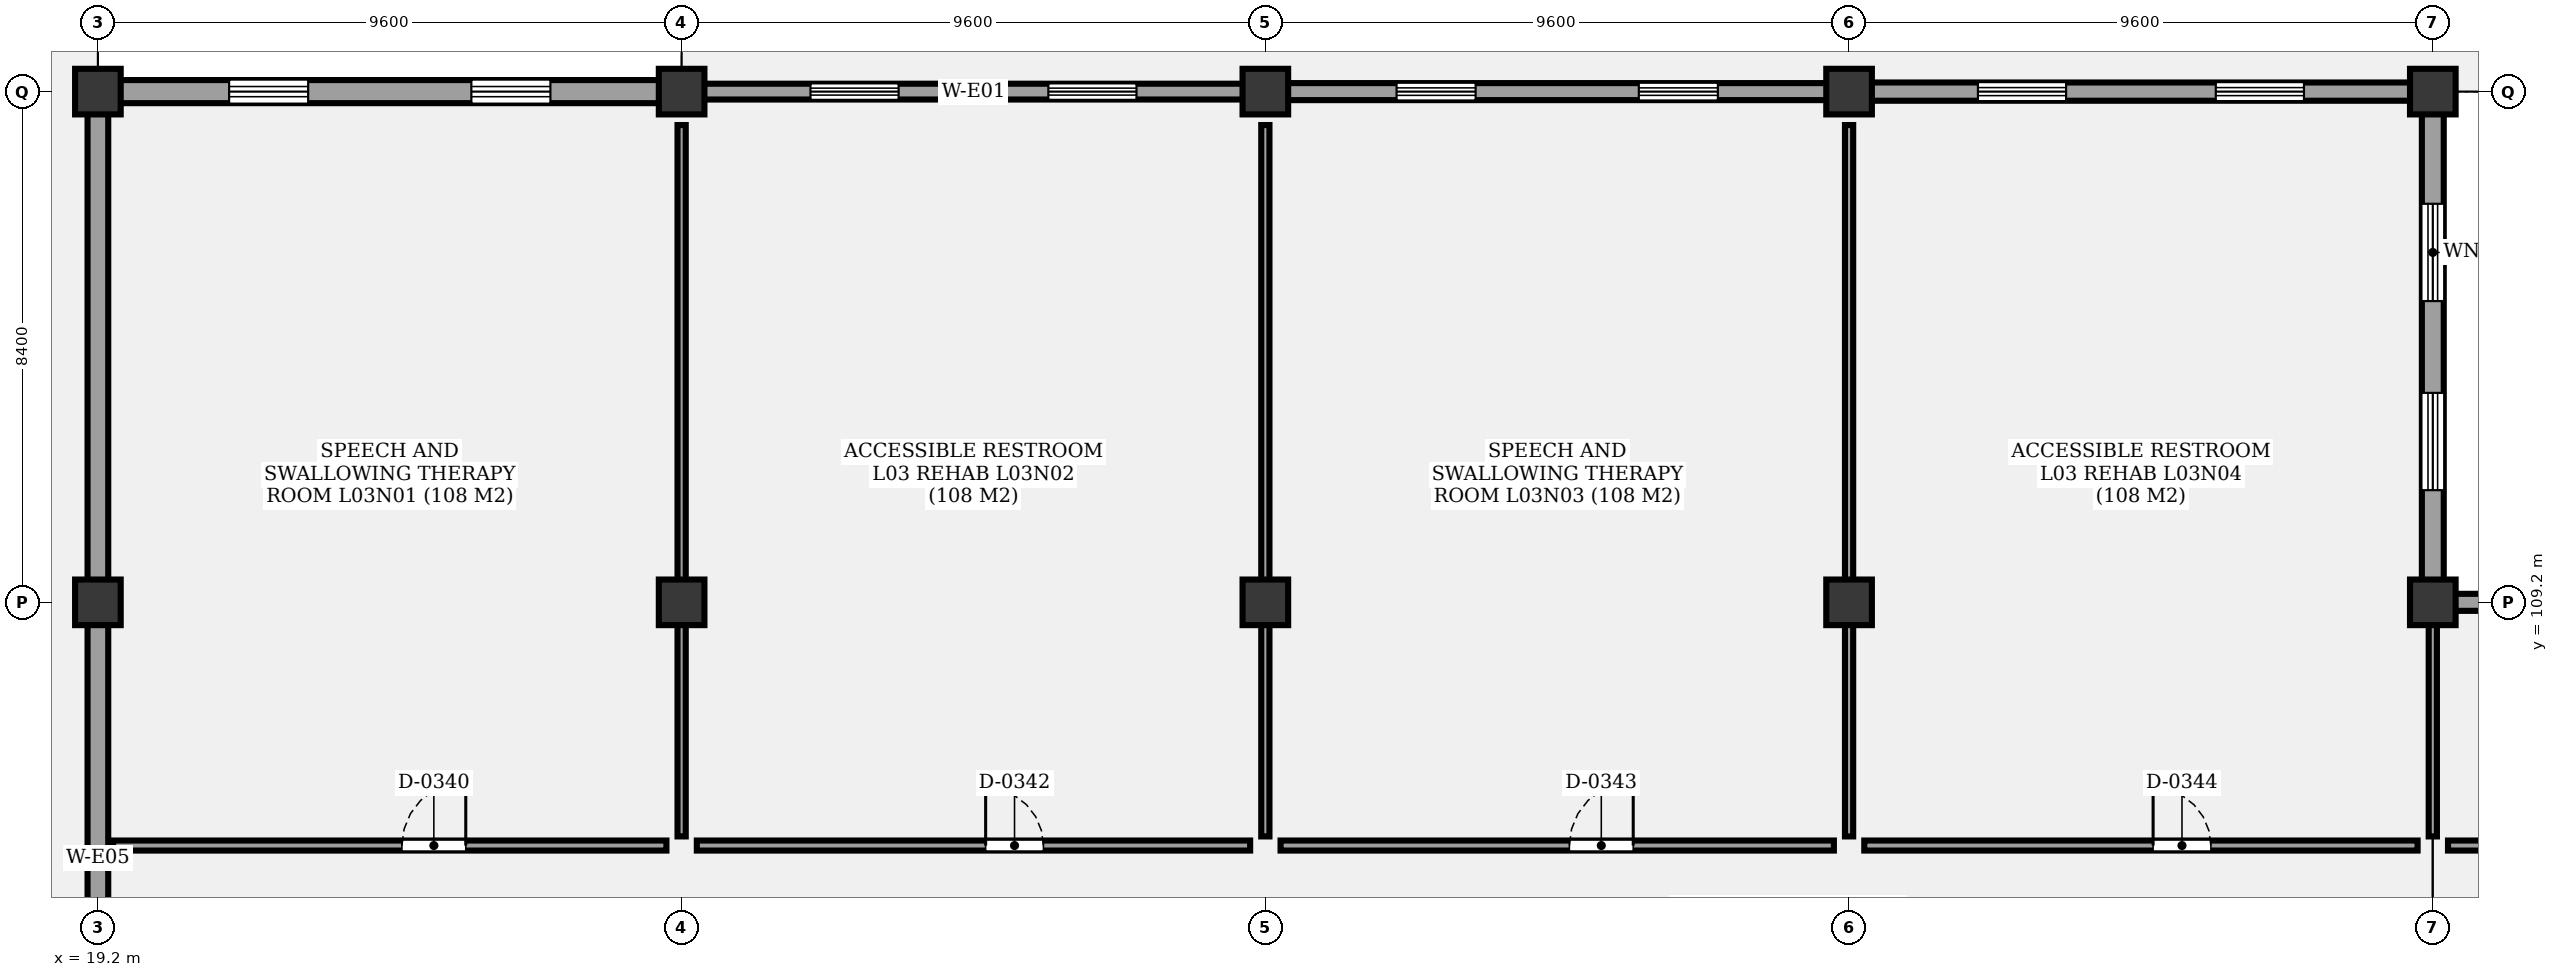
"""IFC4 building model, lengths in metres.
Left out: names, types, materials, properties, quantities, classifications, styles, units other than length and angle.
Written with IfcOpenShell. Run it as: python <this file> out.ifc"""

import sys

from ifc_helpers import new_model, si_unit, direction, frame, frame_2d, origin, origin_2d, place, context, subcontext, project, spatial, rectangle, extrude, element, fill, save


model = new_model("IFC4")
c1 = context("Model", 3, precision=1e-05, world=origin(), true_north=direction((0.0, 1.0)))
c2 = subcontext(c1, "Body", "Model", "MODEL_VIEW")
j1 = project(units=[si_unit("LENGTHUNIT", "METRE"), si_unit("PLANEANGLEUNIT", "RADIAN")], contexts=[c1])
p1 = place(None, origin())
s1 = spatial("IfcSite", under=j1, at=p1, CompositionType="ELEMENT")
p2 = place(p1, origin())
s2 = spatial("IfcBuilding", under=s1, at=p2, CompositionType="ELEMENT")
p3 = place(p2, frame((0.0, 0.0, 13.5)))
s3 = spatial("IfcBuildingStorey", under=s2, at=p3, CompositionType="ELEMENT", Elevation=13.5)
for number, where, z_axis, x_axis in (
    (1, (19.2, 109.2, 0.0), (0.0, 0.0, 1.0), (1.0, 0.0, 0.0)),
    (2, (19.2, 117.6, 0.0), (0.0, 0.0, 1.0), (1.0, 0.0, 0.0)),
    (3, (28.8, 109.2, 0.0), (0.0, 0.0, 1.0), (1.0, 0.0, 0.0)),
    (4, (28.8, 117.6, 0.0), (0.0, 0.0, 1.0), (1.0, 0.0, 0.0)),
    (5, (38.4, 109.2, 0.0), (0.0, 0.0, 1.0), (1.0, 0.0, 0.0)),
    (6, (38.4, 117.6, 0.0), (0.0, 0.0, 1.0), (1.0, 0.0, 0.0)),
    (7, (48.0, 109.2, 0.0), (0.0, 0.0, 1.0), (1.0, 0.0, 0.0)),
    (8, (48.0, 117.6, 0.0), (0.0, 0.0, 1.0), (1.0, 0.0, 0.0)),
    (9, (57.6, 109.2, 0.0), (0.0, 0.0, 1.0), (1.0, 0.0, 0.0)),
    (10, (57.6, 117.6, 0.0), (0.0, 0.0, 1.0), (1.0, 0.0, 0.0)),
):
    element("IfcColumn", number, at=place(p3, frame(where, z_axis=z_axis, x_axis=x_axis)), inside=s3, PredefinedType="COLUMN", context=c2, shape_type="SweptSolid", body=[
        extrude(rectangle(XDim=0.75, YDim=0.75, at=origin_2d()), origin(), (0.0, 0.0, 1.0), 4.3),
    ])
p4 = place(p3, frame((57.6, 109.2, 0.0), z_axis=(0.0, 0.0, 1.0), x_axis=(1.0, 0.0, 0.0)))
e11 = element("IfcWall", 11, at=p4, inside=s3, PredefinedType="SOLIDWALL", context=c2, shape_type="SweptSolid", body=[
    extrude(rectangle(XDim=9.6, YDim=0.28, at=frame_2d((4.8, 0.0))), origin(), (0.0, 0.0, 1.0), 3.49),
])
p5 = place(p4, frame((2.119, 0.0, 0.85)))
e12 = element("IfcOpeningElement", 12, at=p5, cuts=e11, PredefinedType="OPENING", context=c2, shape_type="SweptSolid", body=[
    extrude(rectangle(XDim=1.45, YDim=1.2, at=frame_2d((0.725, 0.6))), frame((0.0, 0.15, 0.0), z_axis=(0.0, -1.0, 0.0), x_axis=(1.0, 0.0, 0.0)), (0.0, 0.0, 1.0), 0.3),
])
p6 = place(p4, frame((6.031, 0.0, 0.85)))
e13 = element("IfcOpeningElement", 13, at=p6, cuts=e11, PredefinedType="OPENING", context=c2, shape_type="SweptSolid", body=[
    extrude(rectangle(XDim=1.45, YDim=1.2, at=frame_2d((0.725, 0.6))), frame((0.0, 0.15, 0.0), z_axis=(0.0, -1.0, 0.0), x_axis=(1.0, 0.0, 0.0)), (0.0, 0.0, 1.0), 0.3),
])
p7 = place(p3, frame((19.2, 117.6, 0.0), z_axis=(0.0, 0.0, 1.0), x_axis=(1.0, 0.0, 0.0)))
e14 = element("IfcWall", 14, at=p7, inside=s3, PredefinedType="SOLIDWALL", context=c2, shape_type="SweptSolid", body=[
    extrude(rectangle(XDim=9.6, YDim=0.38, at=frame_2d((4.8, 0.0))), origin(), (0.0, 0.0, 1.0), 3.49),
])
p8 = place(p7, frame((2.158, 0.0, 0.85)))
e15 = element("IfcOpeningElement", 15, at=p8, cuts=e14, PredefinedType="OPENING", context=c2, shape_type="SweptSolid", body=[
    extrude(rectangle(XDim=1.3, YDim=1.2, at=frame_2d((0.65, 0.6))), frame((0.0, 0.2, 0.0), z_axis=(0.0, -1.0, 0.0), x_axis=(1.0, 0.0, 0.0)), (0.0, 0.0, 1.0), 0.4),
])
p9 = place(p7, frame((6.142, 0.0, 0.85)))
e16 = element("IfcOpeningElement", 16, at=p9, cuts=e14, PredefinedType="OPENING", context=c2, shape_type="SweptSolid", body=[
    extrude(rectangle(XDim=1.3, YDim=1.2, at=frame_2d((0.65, 0.6))), frame((0.0, 0.2, 0.0), z_axis=(0.0, -1.0, 0.0), x_axis=(1.0, 0.0, 0.0)), (0.0, 0.0, 1.0), 0.4),
])
p10 = place(p3, frame((28.8, 117.6, 0.0), z_axis=(0.0, 0.0, 1.0), x_axis=(1.0, 0.0, 0.0)))
e17 = element("IfcWall", 17, at=p10, inside=s3, PredefinedType="SOLIDWALL", context=c2, shape_type="SweptSolid", body=[
    extrude(rectangle(XDim=9.6, YDim=0.26, at=frame_2d((4.8, 0.0))), origin(), (0.0, 0.0, 1.0), 3.49),
])
p11 = place(p10, frame((2.119, 0.0, 0.85)))
e18 = element("IfcOpeningElement", 18, at=p11, cuts=e17, PredefinedType="OPENING", context=c2, shape_type="SweptSolid", body=[
    extrude(rectangle(XDim=1.45, YDim=1.2, at=frame_2d((0.725, 0.6))), frame((0.0, 0.14, 0.0), z_axis=(0.0, -1.0, 0.0), x_axis=(1.0, 0.0, 0.0)), (0.0, 0.0, 1.0), 0.28),
])
p12 = place(p10, frame((6.031, 0.0, 0.85)))
e19 = element("IfcOpeningElement", 19, at=p12, cuts=e17, PredefinedType="OPENING", context=c2, shape_type="SweptSolid", body=[
    extrude(rectangle(XDim=1.45, YDim=1.2, at=frame_2d((0.725, 0.6))), frame((0.0, 0.14, 0.0), z_axis=(0.0, -1.0, 0.0), x_axis=(1.0, 0.0, 0.0)), (0.0, 0.0, 1.0), 0.28),
])
p13 = place(p3, frame((38.4, 117.6, 0.0), z_axis=(0.0, 0.0, 1.0), x_axis=(1.0, 0.0, 0.0)))
e20 = element("IfcWall", 20, at=p13, inside=s3, PredefinedType="SOLIDWALL", context=c2, shape_type="SweptSolid", body=[
    extrude(rectangle(XDim=9.6, YDim=0.28, at=frame_2d((4.8, 0.0))), origin(), (0.0, 0.0, 1.0), 3.49),
])
p14 = place(p13, frame((2.158, 0.0, 0.85)))
e21 = element("IfcOpeningElement", 21, at=p14, cuts=e20, PredefinedType="OPENING", context=c2, shape_type="SweptSolid", body=[
    extrude(rectangle(XDim=1.3, YDim=1.2, at=frame_2d((0.65, 0.6))), frame((0.0, 0.15, 0.0), z_axis=(0.0, -1.0, 0.0), x_axis=(1.0, 0.0, 0.0)), (0.0, 0.0, 1.0), 0.3),
])
p15 = place(p13, frame((6.142, 0.0, 0.85)))
e22 = element("IfcOpeningElement", 22, at=p15, cuts=e20, PredefinedType="OPENING", context=c2, shape_type="SweptSolid", body=[
    extrude(rectangle(XDim=1.3, YDim=1.2, at=frame_2d((0.65, 0.6))), frame((0.0, 0.15, 0.0), z_axis=(0.0, -1.0, 0.0), x_axis=(1.0, 0.0, 0.0)), (0.0, 0.0, 1.0), 0.3),
])
p16 = place(p3, frame((48.0, 117.6, 0.0), z_axis=(0.0, 0.0, 1.0), x_axis=(1.0, 0.0, 0.0)))
e23 = element("IfcWall", 23, at=p16, inside=s3, PredefinedType="SOLIDWALL", context=c2, shape_type="SweptSolid", body=[
    extrude(rectangle(XDim=9.6, YDim=0.3, at=frame_2d((4.8, 0.0))), origin(), (0.0, 0.0, 1.0), 3.49),
])
p17 = place(p16, frame((2.119, 0.0, 0.85)))
e24 = element("IfcOpeningElement", 24, at=p17, cuts=e23, PredefinedType="OPENING", context=c2, shape_type="SweptSolid", body=[
    extrude(rectangle(XDim=1.45, YDim=1.2, at=frame_2d((0.725, 0.6))), frame((0.0, 0.16, 0.0), z_axis=(0.0, -1.0, 0.0), x_axis=(1.0, 0.0, 0.0)), (0.0, 0.0, 1.0), 0.32),
])
p18 = place(p16, frame((6.031, 0.0, 0.85)))
e25 = element("IfcOpeningElement", 25, at=p18, cuts=e23, PredefinedType="OPENING", context=c2, shape_type="SweptSolid", body=[
    extrude(rectangle(XDim=1.45, YDim=1.2, at=frame_2d((0.725, 0.6))), frame((0.0, 0.16, 0.0), z_axis=(0.0, -1.0, 0.0), x_axis=(1.0, 0.0, 0.0)), (0.0, 0.0, 1.0), 0.32),
])
p19 = place(p3, frame((19.2, 92.56, 0.0), z_axis=(0.0, 0.0, 1.0), x_axis=(0.0, 1.0, 0.0)))
e26 = element("IfcWall", 26, at=p19, inside=s3, PredefinedType="SOLIDWALL", context=c2, shape_type="SweptSolid", body=[
    extrude(rectangle(XDim=24.88, YDim=0.34, at=frame_2d((12.44, 0.0))), origin(), (0.0, 0.0, 1.0), 3.49),
])
p20 = place(p3, frame((57.6, 117.44, 0.0), z_axis=(0.0, 0.0, 1.0), x_axis=(0.0, -1.0, 0.0)))
e27 = element("IfcWall", 27, at=p20, inside=s3, PredefinedType="SOLIDWALL", context=c2, shape_type="SweptSolid", body=[
    extrude(rectangle(XDim=8.08, YDim=0.36, at=frame_2d((4.04, 0.0))), origin(), (0.0, 0.0, 1.0), 3.49),
])
p21 = place(p20, frame((1.685, 0.0, 0.85)))
e28 = element("IfcOpeningElement", 28, at=p21, cuts=e27, PredefinedType="OPENING", context=c2, shape_type="SweptSolid", body=[
    extrude(rectangle(XDim=1.6, YDim=1.2, at=frame_2d((0.8, 0.6))), frame((0.0, 0.19, 0.0), z_axis=(0.0, -1.0, 0.0), x_axis=(1.0, 0.0, 0.0)), (0.0, 0.0, 1.0), 0.38),
])
p22 = place(p20, frame((4.795, 0.0, 0.85)))
e29 = element("IfcOpeningElement", 29, at=p22, cuts=e27, PredefinedType="OPENING", context=c2, shape_type="SweptSolid", body=[
    extrude(rectangle(XDim=1.6, YDim=1.2, at=frame_2d((0.8, 0.6))), frame((0.0, 0.19, 0.0), z_axis=(0.0, -1.0, 0.0), x_axis=(1.0, 0.0, 0.0)), (0.0, 0.0, 1.0), 0.38),
])
p23 = place(p3, frame((19.45, 105.2, 0.0), z_axis=(0.0, 0.0, 1.0), x_axis=(1.0, 0.0, 0.0)))
e30 = element("IfcWall", 30, at=p23, inside=s3, PredefinedType="PARTITIONING", context=c2, shape_type="SweptSolid", body=[
    extrude(rectangle(XDim=9.1, YDim=0.165, at=frame_2d((4.55, 0.0))), origin(), (0.0, 0.0, 1.0), 3.4),
])
p24 = place(p23, frame((4.75, 0.0, 0.0)))
e31 = element("IfcOpeningElement", 31, at=p24, cuts=e30, PredefinedType="OPENING", context=c2, shape_type="SweptSolid", body=[
    extrude(rectangle(XDim=1.05, YDim=2.1, at=frame_2d((0.525, 1.05))), frame((0.0, 0.093, 0.0), z_axis=(0.0, -1.0, 0.0), x_axis=(1.0, 0.0, 0.0)), (0.0, 0.0, 1.0), 0.185),
])
p25 = place(p3, frame((29.05, 105.2, 0.0), z_axis=(0.0, 0.0, 1.0), x_axis=(1.0, 0.0, 0.0)))
e32 = element("IfcWall", 32, at=p25, inside=s3, PredefinedType="PARTITIONING", context=c2, shape_type="SweptSolid", body=[
    extrude(rectangle(XDim=9.1, YDim=0.165, at=frame_2d((4.55, 0.0))), origin(), (0.0, 0.0, 1.0), 3.4),
])
p26 = place(p25, frame((4.75, 0.0, 0.0)))
e33 = element("IfcOpeningElement", 33, at=p26, cuts=e32, PredefinedType="OPENING", context=c2, shape_type="SweptSolid", body=[
    extrude(rectangle(XDim=0.95, YDim=2.1, at=frame_2d((0.475, 1.05))), frame((0.0, 0.093, 0.0), z_axis=(0.0, -1.0, 0.0), x_axis=(1.0, 0.0, 0.0)), (0.0, 0.0, 1.0), 0.185),
])
p27 = place(p3, frame((28.8, 105.35, 0.0), z_axis=(0.0, 0.0, 1.0), x_axis=(0.0, 1.0, 0.0)))
e34 = element("IfcWall", 34, at=p27, inside=s3, PredefinedType="PARTITIONING", context=c2, shape_type="SweptSolid", body=[
    extrude(rectangle(XDim=11.7, YDim=0.135, at=frame_2d((5.85, 0.0))), origin(), (0.0, 0.0, 1.0), 3.4),
])
p28 = place(p3, frame((38.65, 105.2, 0.0), z_axis=(0.0, 0.0, 1.0), x_axis=(1.0, 0.0, 0.0)))
e35 = element("IfcWall", 35, at=p28, inside=s3, PredefinedType="PARTITIONING", context=c2, shape_type="SweptSolid", body=[
    extrude(rectangle(XDim=9.1, YDim=0.165, at=frame_2d((4.55, 0.0))), origin(), (0.0, 0.0, 1.0), 3.4),
])
p29 = place(p28, frame((4.75, 0.0, 0.0)))
e36 = element("IfcOpeningElement", 36, at=p29, cuts=e35, PredefinedType="OPENING", context=c2, shape_type="SweptSolid", body=[
    extrude(rectangle(XDim=1.05, YDim=2.1, at=frame_2d((0.525, 1.05))), frame((0.0, 0.093, 0.0), z_axis=(0.0, -1.0, 0.0), x_axis=(1.0, 0.0, 0.0)), (0.0, 0.0, 1.0), 0.185),
])
p30 = place(p3, frame((38.4, 105.35, 0.0), z_axis=(0.0, 0.0, 1.0), x_axis=(0.0, 1.0, 0.0)))
e37 = element("IfcWall", 37, at=p30, inside=s3, PredefinedType="PARTITIONING", context=c2, shape_type="SweptSolid", body=[
    extrude(rectangle(XDim=11.7, YDim=0.135, at=frame_2d((5.85, 0.0))), origin(), (0.0, 0.0, 1.0), 3.4),
])
p31 = place(p3, frame((48.25, 105.2, 0.0), z_axis=(0.0, 0.0, 1.0), x_axis=(1.0, 0.0, 0.0)))
e38 = element("IfcWall", 38, at=p31, inside=s3, PredefinedType="PARTITIONING", context=c2, shape_type="SweptSolid", body=[
    extrude(rectangle(XDim=9.1, YDim=0.165, at=frame_2d((4.55, 0.0))), origin(), (0.0, 0.0, 1.0), 3.4),
])
p32 = place(p31, frame((4.75, 0.0, 0.0)))
e39 = element("IfcOpeningElement", 39, at=p32, cuts=e38, PredefinedType="OPENING", context=c2, shape_type="SweptSolid", body=[
    extrude(rectangle(XDim=0.95, YDim=2.1, at=frame_2d((0.475, 1.05))), frame((0.0, 0.093, 0.0), z_axis=(0.0, -1.0, 0.0), x_axis=(1.0, 0.0, 0.0)), (0.0, 0.0, 1.0), 0.185),
])
p33 = place(p3, frame((48.0, 105.35, 0.0), z_axis=(0.0, 0.0, 1.0), x_axis=(0.0, 1.0, 0.0)))
e40 = element("IfcWall", 40, at=p33, inside=s3, PredefinedType="PARTITIONING", context=c2, shape_type="SweptSolid", body=[
    extrude(rectangle(XDim=11.7, YDim=0.135, at=frame_2d((5.85, 0.0))), origin(), (0.0, 0.0, 1.0), 3.4),
])
p34 = place(p3, frame((57.85, 105.2, 0.0), z_axis=(0.0, 0.0, 1.0), x_axis=(1.0, 0.0, 0.0)))
e41 = element("IfcWall", 41, at=p34, inside=s3, PredefinedType="PARTITIONING", context=c2, shape_type="SweptSolid", body=[
    extrude(rectangle(XDim=9.1, YDim=0.165, at=frame_2d((4.55, 0.0))), origin(), (0.0, 0.0, 1.0), 3.4),
])
p35 = place(p34, frame((4.75, 0.0, 0.0)))
e42 = element("IfcOpeningElement", 42, at=p35, cuts=e41, PredefinedType="OPENING", context=c2, shape_type="SweptSolid", body=[
    extrude(rectangle(XDim=1.05, YDim=2.1, at=frame_2d((0.525, 1.05))), frame((0.0, 0.093, 0.0), z_axis=(0.0, -1.0, 0.0), x_axis=(1.0, 0.0, 0.0)), (0.0, 0.0, 1.0), 0.185),
])
p36 = place(p3, frame((57.6, 105.35, 0.0), z_axis=(0.0, 0.0, 1.0), x_axis=(0.0, 1.0, 0.0)))
e43 = element("IfcWall", 43, at=p36, inside=s3, PredefinedType="PARTITIONING", context=c2, shape_type="SweptSolid", body=[
    extrude(rectangle(XDim=3.65, YDim=0.135, at=frame_2d((1.825, 0.0))), origin(), (0.0, 0.0, 1.0), 3.4),
])
p37 = place(p8, origin())
e44 = element("IfcWindow", 44, at=p37, inside=s3, PartitioningType="SINGLE_PANEL", PredefinedType="WINDOW", context=c2, shape_type="SweptSolid", body=[
    extrude(rectangle(XDim=1.3, YDim=1.2, at=frame_2d((0.65, 0.6))), frame((0.0, 0.03, 0.0), z_axis=(0.0, -1.0, 0.0), x_axis=(1.0, 0.0, 0.0)), (0.0, 0.0, 1.0), 0.06),
])
fill(e15, e44)
p38 = place(p9, origin())
e45 = element("IfcWindow", 45, at=p38, inside=s3, PartitioningType="SINGLE_PANEL", PredefinedType="WINDOW", context=c2, shape_type="SweptSolid", body=[
    extrude(rectangle(XDim=1.3, YDim=1.2, at=frame_2d((0.65, 0.6))), frame((0.0, 0.03, 0.0), z_axis=(0.0, -1.0, 0.0), x_axis=(1.0, 0.0, 0.0)), (0.0, 0.0, 1.0), 0.06),
])
fill(e16, e45)
p39 = place(p11, origin())
e46 = element("IfcWindow", 46, at=p39, inside=s3, PartitioningType="SINGLE_PANEL", PredefinedType="WINDOW", context=c2, shape_type="SweptSolid", body=[
    extrude(rectangle(XDim=1.45, YDim=1.2, at=frame_2d((0.725, 0.6))), frame((0.0, 0.03, 0.0), z_axis=(0.0, -1.0, 0.0), x_axis=(1.0, 0.0, 0.0)), (0.0, 0.0, 1.0), 0.06),
])
fill(e18, e46)
p40 = place(p12, origin())
e47 = element("IfcWindow", 47, at=p40, inside=s3, PartitioningType="SINGLE_PANEL", PredefinedType="WINDOW", context=c2, shape_type="SweptSolid", body=[
    extrude(rectangle(XDim=1.45, YDim=1.2, at=frame_2d((0.725, 0.6))), frame((0.0, 0.03, 0.0), z_axis=(0.0, -1.0, 0.0), x_axis=(1.0, 0.0, 0.0)), (0.0, 0.0, 1.0), 0.06),
])
fill(e19, e47)
p41 = place(p14, origin())
e48 = element("IfcWindow", 48, at=p41, inside=s3, PartitioningType="SINGLE_PANEL", PredefinedType="WINDOW", context=c2, shape_type="SweptSolid", body=[
    extrude(rectangle(XDim=1.3, YDim=1.2, at=frame_2d((0.65, 0.6))), frame((0.0, 0.03, 0.0), z_axis=(0.0, -1.0, 0.0), x_axis=(1.0, 0.0, 0.0)), (0.0, 0.0, 1.0), 0.06),
])
fill(e21, e48)
p42 = place(p15, origin())
e49 = element("IfcWindow", 49, at=p42, inside=s3, PartitioningType="SINGLE_PANEL", PredefinedType="WINDOW", context=c2, shape_type="SweptSolid", body=[
    extrude(rectangle(XDim=1.3, YDim=1.2, at=frame_2d((0.65, 0.6))), frame((0.0, 0.03, 0.0), z_axis=(0.0, -1.0, 0.0), x_axis=(1.0, 0.0, 0.0)), (0.0, 0.0, 1.0), 0.06),
])
fill(e22, e49)
p43 = place(p17, origin())
e50 = element("IfcWindow", 50, at=p43, inside=s3, PartitioningType="SINGLE_PANEL", PredefinedType="WINDOW", context=c2, shape_type="SweptSolid", body=[
    extrude(rectangle(XDim=1.45, YDim=1.2, at=frame_2d((0.725, 0.6))), frame((0.0, 0.03, 0.0), z_axis=(0.0, -1.0, 0.0), x_axis=(1.0, 0.0, 0.0)), (0.0, 0.0, 1.0), 0.06),
])
fill(e24, e50)
p44 = place(p18, origin())
e51 = element("IfcWindow", 51, at=p44, inside=s3, PartitioningType="SINGLE_PANEL", PredefinedType="WINDOW", context=c2, shape_type="SweptSolid", body=[
    extrude(rectangle(XDim=1.45, YDim=1.2, at=frame_2d((0.725, 0.6))), frame((0.0, 0.03, 0.0), z_axis=(0.0, -1.0, 0.0), x_axis=(1.0, 0.0, 0.0)), (0.0, 0.0, 1.0), 0.06),
])
fill(e25, e51)
p45 = place(p21, origin())
e52 = element("IfcWindow", 52, at=p45, inside=s3, PartitioningType="SINGLE_PANEL", PredefinedType="WINDOW", context=c2, shape_type="SweptSolid", body=[
    extrude(rectangle(XDim=1.6, YDim=1.2, at=frame_2d((0.8, 0.6))), frame((0.0, 0.03, 0.0), z_axis=(0.0, -1.0, 0.0), x_axis=(1.0, 0.0, 0.0)), (0.0, 0.0, 1.0), 0.06),
])
fill(e28, e52)
p46 = place(p22, origin())
e53 = element("IfcWindow", 53, at=p46, inside=s3, PartitioningType="SINGLE_PANEL", PredefinedType="WINDOW", context=c2, shape_type="SweptSolid", body=[
    extrude(rectangle(XDim=1.6, YDim=1.2, at=frame_2d((0.8, 0.6))), frame((0.0, 0.03, 0.0), z_axis=(0.0, -1.0, 0.0), x_axis=(1.0, 0.0, 0.0)), (0.0, 0.0, 1.0), 0.06),
])
fill(e29, e53)
p47 = place(p24, origin())
e54 = element("IfcDoor", 54, at=p47, inside=s3, OperationType="SINGLE_SWING_RIGHT", PredefinedType="DOOR", context=c2, shape_type="SweptSolid", body=[
    extrude(rectangle(XDim=1.05, YDim=2.1, at=frame_2d((0.525, 1.05))), frame((0.0, 0.025, 0.0), z_axis=(0.0, -1.0, 0.0), x_axis=(1.0, 0.0, 0.0)), (0.0, 0.0, 1.0), 0.05),
])
fill(e31, e54)
p48 = place(p26, origin())
e55 = element("IfcDoor", 55, at=p48, inside=s3, OperationType="SINGLE_SWING_LEFT", PredefinedType="DOOR", context=c2, shape_type="SweptSolid", body=[
    extrude(rectangle(XDim=0.95, YDim=2.1, at=frame_2d((0.475, 1.05))), frame((0.0, 0.025, 0.0), z_axis=(0.0, -1.0, 0.0), x_axis=(1.0, 0.0, 0.0)), (0.0, 0.0, 1.0), 0.05),
])
fill(e33, e55)
p49 = place(p29, origin())
e56 = element("IfcDoor", 56, at=p49, inside=s3, OperationType="SINGLE_SWING_RIGHT", PredefinedType="DOOR", context=c2, shape_type="SweptSolid", body=[
    extrude(rectangle(XDim=1.05, YDim=2.1, at=frame_2d((0.525, 1.05))), frame((0.0, 0.025, 0.0), z_axis=(0.0, -1.0, 0.0), x_axis=(1.0, 0.0, 0.0)), (0.0, 0.0, 1.0), 0.05),
])
fill(e36, e56)
p50 = place(p32, origin())
e57 = element("IfcDoor", 57, at=p50, inside=s3, OperationType="SINGLE_SWING_LEFT", PredefinedType="DOOR", context=c2, shape_type="SweptSolid", body=[
    extrude(rectangle(XDim=0.95, YDim=2.1, at=frame_2d((0.475, 1.05))), frame((0.0, 0.025, 0.0), z_axis=(0.0, -1.0, 0.0), x_axis=(1.0, 0.0, 0.0)), (0.0, 0.0, 1.0), 0.05),
])
fill(e39, e57)
save(model, sys.argv[1])
